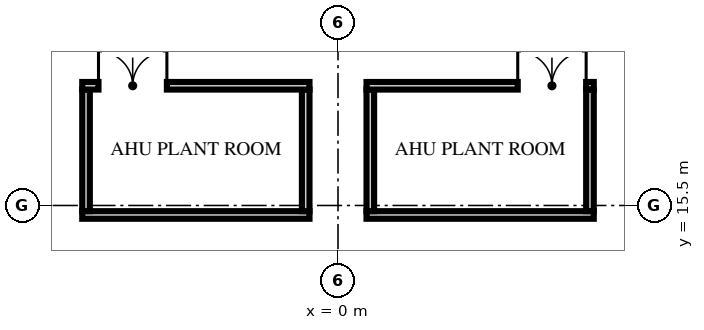
"""IFC4 building model, lengths in metres.
Left out: names, types, materials, properties, quantities, classifications, styles, units other than length and angle.
Written with IfcOpenShell. Run it as: python <this file> out.ifc"""

import sys

from ifc_helpers import new_model, si_unit, direction, frame, frame_2d, origin, place, context, subcontext, project, spatial, rectangle, extrude, element, fill, save


model = new_model("IFC4")
c1 = context("Model", 3, precision=1e-05, world=origin(), true_north=direction((0.0, 1.0)))
c2 = subcontext(c1, "Body", "Model", "MODEL_VIEW")
j1 = project(units=[si_unit("LENGTHUNIT", "METRE"), si_unit("PLANEANGLEUNIT", "RADIAN")], contexts=[c1])
p1 = place(None, origin())
s1 = spatial("IfcSite", under=j1, at=p1, CompositionType="ELEMENT")
p2 = place(p1, origin())
s2 = spatial("IfcBuilding", under=s1, at=p2, CompositionType="ELEMENT")
p3 = place(p2, frame((0.0, 0.0, 353.25)))
s3 = spatial("IfcBuildingStorey", under=s2, at=p3, CompositionType="ELEMENT", Elevation=353.25)
for number, where, z_axis, x_axis in (
    (1, (-6.73, 15.25, 0.0), (0.0, 0.0, 1.0), (1.0, 0.0, 0.0)),
    (2, (0.75, 15.25, 0.0), (0.0, 0.0, 1.0), (1.0, 0.0, 0.0)),
):
    element("IfcWall", number, at=place(p3, frame(where, z_axis=z_axis, x_axis=x_axis)), inside=s3, PredefinedType="SOLIDWALL", context=c2, shape_type="SweptSolid", body=[
        extrude(rectangle(XDim=5.98, YDim=0.2, at=frame_2d((2.99, 0.0))), origin(), (0.0, 0.0, 1.0), 3.91),
    ])
for number, where, z_axis, x_axis in (
    (3, (-6.63, 15.35, 0.0), (0.0, 0.0, 1.0), (0.0, 1.0, 0.0)),
    (4, (-0.85, 15.35, 0.0), (0.0, 0.0, 1.0), (0.0, 1.0, 0.0)),
    (5, (0.85, 15.35, 0.0), (0.0, 0.0, 1.0), (0.0, 1.0, 0.0)),
    (6, (6.63, 15.35, 0.0), (0.0, 0.0, 1.0), (0.0, 1.0, 0.0)),
):
    element("IfcWall", number, at=place(p3, frame(where, z_axis=z_axis, x_axis=x_axis)), inside=s3, PredefinedType="SOLIDWALL", context=c2, shape_type="SweptSolid", body=[
        extrude(rectangle(XDim=3.2, YDim=0.2, at=frame_2d((1.6, 0.0))), origin(), (0.0, 0.0, 1.0), 4.7),
    ])
p4 = place(p3, frame((-6.73, 18.65, 0.0), z_axis=(0.0, 0.0, 1.0), x_axis=(1.0, 0.0, 0.0)))
e7 = element("IfcWall", 7, at=p4, inside=s3, PredefinedType="SOLIDWALL", context=c2, shape_type="SweptSolid", body=[
    extrude(rectangle(XDim=5.98, YDim=0.2, at=frame_2d((2.99, 0.0))), origin(), (0.0, 0.0, 1.0), 3.91),
])
p5 = place(p4, frame((0.427, 0.0, 0.0)))
e8 = element("IfcOpeningElement", 8, at=p5, cuts=e7, PredefinedType="OPENING", context=c2, shape_type="SweptSolid", body=[
    extrude(rectangle(XDim=1.8, YDim=2.4, at=frame_2d((0.9, 1.2))), frame((0.0, 0.11, 0.0), z_axis=(0.0, -1.0, 0.0), x_axis=(1.0, 0.0, 0.0)), (0.0, 0.0, 1.0), 0.22),
])
p6 = place(p3, frame((0.75, 18.65, 0.0), z_axis=(0.0, 0.0, 1.0), x_axis=(1.0, 0.0, 0.0)))
e9 = element("IfcWall", 9, at=p6, inside=s3, PredefinedType="SOLIDWALL", context=c2, shape_type="SweptSolid", body=[
    extrude(rectangle(XDim=5.98, YDim=0.2, at=frame_2d((2.99, 0.0))), origin(), (0.0, 0.0, 1.0), 3.91),
])
p7 = place(p6, frame((3.979, 0.0, 0.0)))
e10 = element("IfcOpeningElement", 10, at=p7, cuts=e9, PredefinedType="OPENING", context=c2, shape_type="SweptSolid", body=[
    extrude(rectangle(XDim=1.8, YDim=2.4, at=frame_2d((0.9, 1.2))), frame((0.0, 0.11, 0.0), z_axis=(0.0, -1.0, 0.0), x_axis=(1.0, 0.0, 0.0)), (0.0, 0.0, 1.0), 0.22),
])
p8 = place(p5, origin())
e11 = element("IfcDoor", 11, at=p8, inside=s3, OperationType="DOUBLE_DOOR_SINGLE_SWING", PredefinedType="DOOR", context=c2, shape_type="SweptSolid", body=[
    extrude(rectangle(XDim=1.8, YDim=2.4, at=frame_2d((0.9, 1.2))), frame((0.0, 0.025, 0.0), z_axis=(0.0, -1.0, 0.0), x_axis=(1.0, 0.0, 0.0)), (0.0, 0.0, 1.0), 0.05),
])
fill(e8, e11)
p9 = place(p7, origin())
e12 = element("IfcDoor", 12, at=p9, inside=s3, OperationType="DOUBLE_DOOR_SINGLE_SWING", PredefinedType="DOOR", context=c2, shape_type="SweptSolid", body=[
    extrude(rectangle(XDim=1.8, YDim=2.4, at=frame_2d((0.9, 1.2))), frame((0.0, 0.025, 0.0), z_axis=(0.0, -1.0, 0.0), x_axis=(1.0, 0.0, 0.0)), (0.0, 0.0, 1.0), 0.05),
])
fill(e10, e12)
save(model, sys.argv[1])
